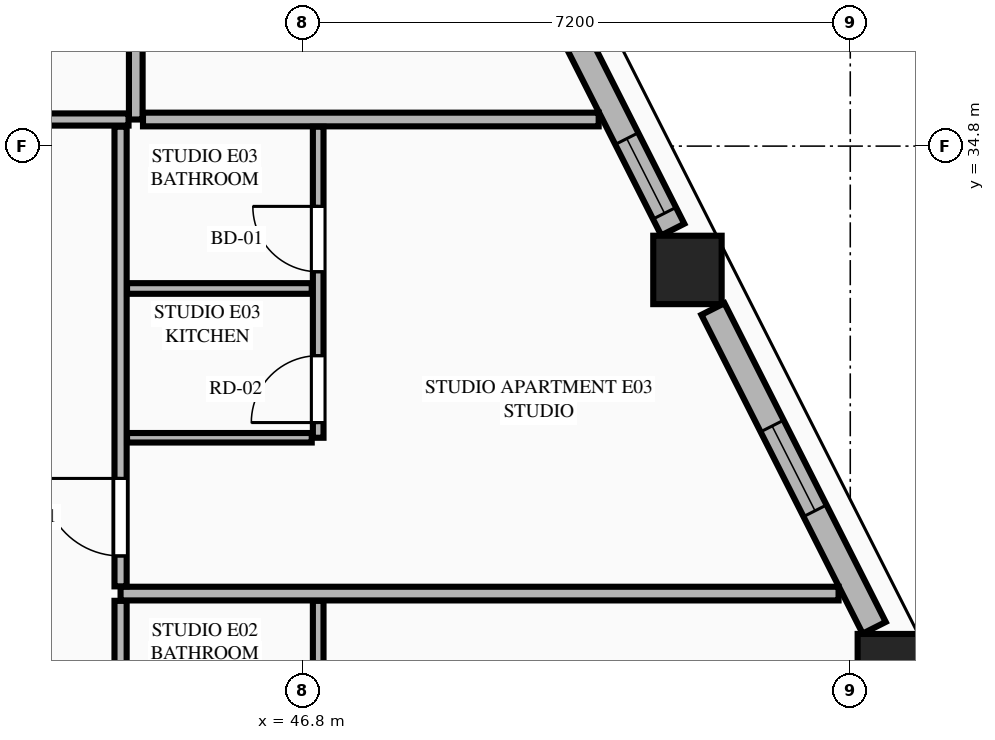
"""IFC4 building model, lengths in metres.
Left out: names, types, materials, properties, quantities, classifications, styles, units other than length and angle.
Written with IfcOpenShell. Run it as: python <this file> out.ifc"""

import sys

from ifc_helpers import new_model, si_unit, direction, frame, frame_2d, origin, origin_2d, place, context, subcontext, project, spatial, rectangle, extrude, element, fill, save


model = new_model("IFC4")
c1 = context("Model", 3, precision=1e-05, world=origin(), true_north=direction((0.0, 1.0)))
c2 = subcontext(c1, "Body", "Model", "MODEL_VIEW")
j1 = project(units=[si_unit("LENGTHUNIT", "METRE"), si_unit("PLANEANGLEUNIT", "RADIAN")], contexts=[c1])
p1 = place(None, origin())
s1 = spatial("IfcSite", under=j1, at=p1, CompositionType="ELEMENT")
p2 = place(p1, origin())
s2 = spatial("IfcBuilding", under=s1, at=p2, CompositionType="ELEMENT")
p3 = place(p2, frame((0.0, 0.0, 203.85)))
s3 = spatial("IfcBuildingStorey", under=s2, at=p3, CompositionType="ELEMENT", Elevation=203.85)
for number, where, z_axis, x_axis in (
    (1, (54.547, 27.932, 0.0), (0.0, 0.0, 1.0), (1.0, 0.0, 0.0)),
    (2, (51.858, 33.171, 0.0), (0.0, 0.0, 1.0), (1.0, 0.0, 0.0)),
):
    element("IfcColumn", number, at=place(p3, frame(where, z_axis=z_axis, x_axis=x_axis)), inside=s3, PredefinedType="COLUMN", context=c2, shape_type="SweptSolid", body=[
        extrude(rectangle(XDim=0.9, YDim=0.9, at=origin_2d()), origin(), (0.0, 0.0, 1.0), 3.55),
    ])
p4 = place(p3, frame((54.315, 28.463, 0.0), z_axis=(0.0, 0.0, 1.0), x_axis=(-0.451426298588, 0.892308409096, 0.0)))
e3 = element("IfcWall", 3, at=p4, inside=s3, PredefinedType="STANDARD", context=c2, shape_type="SweptSolid", body=[
    extrude(rectangle(XDim=4.7, YDim=0.34, at=frame_2d((2.35, 0.0))), origin(), (0.0, 0.0, 1.0), 2.883),
])
p5 = place(p4, frame((1.725, 0.0, 0.75)))
e4 = element("IfcOpeningElement", 4, at=p5, cuts=e3, PredefinedType="OPENING", context=c2, shape_type="SweptSolid", body=[
    extrude(rectangle(XDim=1.25, YDim=1.95, at=frame_2d((0.625, 0.975))), frame((0.0, 0.18, 0.0), z_axis=(0.0, -1.0, 0.0), x_axis=(1.0, 0.0, 0.0)), (0.0, 0.0, 1.0), 0.36),
])
p6 = place(p3, frame((51.665, 33.702, 0.0), z_axis=(0.0, 0.0, 1.0), x_axis=(-0.451524246964, 0.89225884944, 0.0)))
e5 = element("IfcWall", 5, at=p6, inside=s3, PredefinedType="STANDARD", context=c2, shape_type="SweptSolid", body=[
    extrude(rectangle(XDim=4.91, YDim=0.34, at=frame_2d((2.455, 0.0))), origin(), (0.0, 0.0, 1.0), 2.883),
])
p7 = place(p6, frame((0.241, 0.0, 0.75)))
e6 = element("IfcOpeningElement", 6, at=p7, cuts=e5, PredefinedType="OPENING", context=c2, shape_type="SweptSolid", body=[
    extrude(rectangle(XDim=1.1, YDim=1.983, at=frame_2d((0.55, 0.991))), frame((0.0, 0.18, 0.0), z_axis=(0.0, -1.0, 0.0), x_axis=(1.0, 0.0, 0.0)), (0.0, 0.0, 1.0), 0.36),
])
p8 = place(p6, frame((2.847, 0.0, 0.75)))
e7 = element("IfcOpeningElement", 7, at=p8, cuts=e5, PredefinedType="OPENING", context=c2, shape_type="SweptSolid", body=[
    extrude(rectangle(XDim=1.1, YDim=1.983, at=frame_2d((0.55, 0.991))), frame((0.0, 0.18, 0.0), z_axis=(0.0, -1.0, 0.0), x_axis=(1.0, 0.0, 0.0)), (0.0, 0.0, 1.0), 0.36),
])
p9 = place(p3, frame((44.6, 35.15, 0.0), z_axis=(0.0, 0.0, 1.0), x_axis=(0.0, 1.0, 0.0)))
e8 = element("IfcWall", 8, at=p9, inside=s3, PredefinedType="PARTITIONING", context=c2, shape_type="SweptSolid", body=[
    extrude(rectangle(XDim=10.482, YDim=0.18, at=frame_2d((5.241, 0.0))), origin(), (0.0, 0.0, 1.0), 3.35),
])
p10 = place(p3, frame((36.038, 35.15, 0.0), z_axis=(0.0, 0.0, 1.0), x_axis=(1.0, 0.0, 0.0)))
e9 = element("IfcWall", 9, at=p10, inside=s3, PredefinedType="PARTITIONING", context=c2, shape_type="SweptSolid", body=[
    extrude(rectangle(XDim=8.467, YDim=0.16, at=frame_2d((4.233, 0.0))), origin(), (0.0, 0.0, 1.0), 3.35),
])
p11 = place(p10, frame((6.212, 0.0, 0.0)))
e10 = element("IfcOpeningElement", 10, at=p11, cuts=e9, PredefinedType="OPENING", context=c2, shape_type="SweptSolid", body=[
    extrude(rectangle(XDim=1.02, YDim=2.25, at=frame_2d((0.51, 1.125))), frame((0.0, 0.09, 0.0), z_axis=(0.0, -1.0, 0.0), x_axis=(1.0, 0.0, 0.0)), (0.0, 0.0, 1.0), 0.18),
])
p12 = place(p3, frame((44.695, 35.15, 0.0), z_axis=(0.0, 0.0, 1.0), x_axis=(1.0, 0.0, 0.0)))
e11 = element("IfcWall", 11, at=p12, inside=s3, PredefinedType="PARTITIONING", context=c2, shape_type="SweptSolid", body=[
    extrude(rectangle(XDim=5.995, YDim=0.18, at=frame_2d((2.998, 0.0))), origin(), (0.0, 0.0, 1.0), 3.35),
])
p13 = place(p3, frame((44.4, 22.771, 0.0), z_axis=(0.0, 0.0, 1.0), x_axis=(0.0, 1.0, 0.0)))
e12 = element("IfcWall", 12, at=p13, inside=s3, PredefinedType="PARTITIONING", context=c2, shape_type="SweptSolid", body=[
    extrude(rectangle(XDim=6.047, YDim=0.16, at=frame_2d((3.023, 0.0))), origin(), (0.0, 0.0, 1.0), 3.35),
])
p14 = place(p13, frame((0.4, 0.0, 0.0)))
e13 = element("IfcOpeningElement", 13, at=p14, cuts=e12, PredefinedType="OPENING", context=c2, shape_type="SweptSolid", body=[
    extrude(rectangle(XDim=1.02, YDim=2.25, at=frame_2d((0.51, 1.125))), frame((0.0, 0.09, 0.0), z_axis=(0.0, -1.0, 0.0), x_axis=(1.0, 0.0, 0.0)), (0.0, 0.0, 1.0), 0.18),
])
p15 = place(p3, frame((47.0, 24.726, 0.0), z_axis=(0.0, 0.0, 1.0), x_axis=(0.0, 1.0, 0.0)))
e14 = element("IfcWall", 14, at=p15, inside=s3, PredefinedType="PLUMBINGWALL", context=c2, shape_type="SweptSolid", body=[
    extrude(rectangle(XDim=4.092, YDim=0.14, at=frame_2d((2.046, 0.0))), origin(), (0.0, 0.0, 1.0), 3.35),
])
p16 = place(p15, frame((2.184, 0.0, 0.0)))
e15 = element("IfcOpeningElement", 15, at=p16, cuts=e14, PredefinedType="OPENING", context=c2, shape_type="SweptSolid", body=[
    extrude(rectangle(XDim=0.86, YDim=2.1, at=frame_2d((0.43, 1.05))), frame((0.0, 0.08, 0.0), z_axis=(0.0, -1.0, 0.0), x_axis=(1.0, 0.0, 0.0)), (0.0, 0.0, 1.0), 0.16),
])
p17 = place(p15, frame((0.2, 0.0, 0.0)))
e16 = element("IfcOpeningElement", 16, at=p17, cuts=e14, PredefinedType="OPENING", context=c2, shape_type="SweptSolid", body=[
    extrude(rectangle(XDim=0.88, YDim=2.15, at=frame_2d((0.44, 1.075))), frame((0.0, 0.08, 0.0), z_axis=(0.0, -1.0, 0.0), x_axis=(1.0, 0.0, 0.0)), (0.0, 0.0, 1.0), 0.16),
])
p18 = place(p3, frame((44.4, 28.913, 0.0), z_axis=(0.0, 0.0, 1.0), x_axis=(1.0, 0.0, 0.0)))
e17 = element("IfcWall", 17, at=p18, inside=s3, PredefinedType="PARTITIONING", context=c2, shape_type="SweptSolid", body=[
    extrude(rectangle(XDim=9.446, YDim=0.18, at=frame_2d((4.723, 0.0))), origin(), (0.0, 0.0, 1.0), 3.35),
])
p19 = place(p3, frame((44.4, 29.008, 0.0), z_axis=(0.0, 0.0, 1.0), x_axis=(0.0, 1.0, 0.0)))
e18 = element("IfcWall", 18, at=p19, inside=s3, PredefinedType="PARTITIONING", context=c2, shape_type="SweptSolid", body=[
    extrude(rectangle(XDim=6.047, YDim=0.16, at=frame_2d((3.023, 0.0))), origin(), (0.0, 0.0, 1.0), 3.35),
])
p20 = place(p19, frame((0.4, 0.0, 0.0)))
e19 = element("IfcOpeningElement", 19, at=p20, cuts=e18, PredefinedType="OPENING", context=c2, shape_type="SweptSolid", body=[
    extrude(rectangle(XDim=1.02, YDim=2.25, at=frame_2d((0.51, 1.125))), frame((0.0, 0.09, 0.0), z_axis=(0.0, -1.0, 0.0), x_axis=(1.0, 0.0, 0.0)), (0.0, 0.0, 1.0), 0.18),
])
p21 = place(p3, frame((44.485, 30.963, 0.0), z_axis=(0.0, 0.0, 1.0), x_axis=(1.0, 0.0, 0.0)))
e20 = element("IfcWall", 20, at=p21, inside=s3, PredefinedType="PARTITIONING", context=c2, shape_type="SweptSolid", body=[
    extrude(rectangle(XDim=2.43, YDim=0.125, at=frame_2d((1.215, 0.0))), origin(), (0.0, 0.0, 1.0), 3.35),
])
p22 = place(p3, frame((47.0, 30.963, 0.0), z_axis=(0.0, 0.0, 1.0), x_axis=(0.0, 1.0, 0.0)))
e21 = element("IfcWall", 21, at=p22, inside=s3, PredefinedType="PLUMBINGWALL", context=c2, shape_type="SweptSolid", body=[
    extrude(rectangle(XDim=4.092, YDim=0.14, at=frame_2d((2.046, 0.0))), origin(), (0.0, 0.0, 1.0), 3.35),
])
p23 = place(p22, frame((2.184, 0.0, 0.0)))
e22 = element("IfcOpeningElement", 22, at=p23, cuts=e21, PredefinedType="OPENING", context=c2, shape_type="SweptSolid", body=[
    extrude(rectangle(XDim=0.86, YDim=2.1, at=frame_2d((0.43, 1.05))), frame((0.0, 0.08, 0.0), z_axis=(0.0, -1.0, 0.0), x_axis=(1.0, 0.0, 0.0)), (0.0, 0.0, 1.0), 0.16),
])
p24 = place(p22, frame((0.2, 0.0, 0.0)))
e23 = element("IfcOpeningElement", 23, at=p24, cuts=e21, PredefinedType="OPENING", context=c2, shape_type="SweptSolid", body=[
    extrude(rectangle(XDim=0.88, YDim=2.15, at=frame_2d((0.44, 1.075))), frame((0.0, 0.08, 0.0), z_axis=(0.0, -1.0, 0.0), x_axis=(1.0, 0.0, 0.0)), (0.0, 0.0, 1.0), 0.16),
])
p25 = place(p3, frame((44.485, 32.927, 0.0), z_axis=(0.0, 0.0, 1.0), x_axis=(1.0, 0.0, 0.0)))
e24 = element("IfcWall", 24, at=p25, inside=s3, PredefinedType="PLUMBINGWALL", context=c2, shape_type="SweptSolid", body=[
    extrude(rectangle(XDim=2.43, YDim=0.14, at=frame_2d((1.215, 0.0))), origin(), (0.0, 0.0, 1.0), 3.35),
])
p26 = place(p5, origin())
e25 = element("IfcWindow", 25, at=p26, inside=s3, PartitioningType="SINGLE_PANEL", PredefinedType="WINDOW", context=c2, shape_type="SweptSolid", body=[
    extrude(rectangle(XDim=1.25, YDim=1.95, at=frame_2d((0.625, 0.975))), frame((0.0, 0.03, 0.0), z_axis=(0.0, -1.0, 0.0), x_axis=(1.0, 0.0, 0.0)), (0.0, 0.0, 1.0), 0.06),
])
fill(e4, e25)
p27 = place(p7, origin())
e26 = element("IfcWindow", 26, at=p27, inside=s3, PartitioningType="SINGLE_PANEL", PredefinedType="WINDOW", context=c2, shape_type="SweptSolid", body=[
    extrude(rectangle(XDim=1.1, YDim=1.983, at=frame_2d((0.55, 0.991))), frame((0.0, 0.03, 0.0), z_axis=(0.0, -1.0, 0.0), x_axis=(1.0, 0.0, 0.0)), (0.0, 0.0, 1.0), 0.06),
])
fill(e6, e26)
p28 = place(p23, origin())
e27 = element("IfcDoor", 27, at=p28, inside=s3, OperationType="SINGLE_SWING_RIGHT", PredefinedType="DOOR", context=c2, shape_type="SweptSolid", body=[
    extrude(rectangle(XDim=0.86, YDim=2.1, at=frame_2d((0.43, 1.05))), frame((0.0, 0.025, 0.0), z_axis=(0.0, -1.0, 0.0), x_axis=(1.0, 0.0, 0.0)), (0.0, 0.0, 1.0), 0.05),
])
fill(e22, e27)
p29 = place(p20, origin())
e28 = element("IfcDoor", 28, at=p29, inside=s3, OperationType="SINGLE_SWING_RIGHT", PredefinedType="DOOR", context=c2, shape_type="SweptSolid", body=[
    extrude(rectangle(XDim=1.02, YDim=2.25, at=frame_2d((0.51, 1.125))), frame((0.0, 0.025, 0.0), z_axis=(0.0, -1.0, 0.0), x_axis=(1.0, 0.0, 0.0)), (0.0, 0.0, 1.0), 0.05),
])
fill(e19, e28)
p30 = place(p24, origin())
e29 = element("IfcDoor", 29, at=p30, inside=s3, OperationType="SINGLE_SWING_LEFT", PredefinedType="DOOR", context=c2, shape_type="SweptSolid", body=[
    extrude(rectangle(XDim=0.88, YDim=2.15, at=frame_2d((0.44, 1.075))), frame((0.0, 0.025, 0.0), z_axis=(0.0, -1.0, 0.0), x_axis=(1.0, 0.0, 0.0)), (0.0, 0.0, 1.0), 0.05),
])
fill(e23, e29)
save(model, sys.argv[1])
